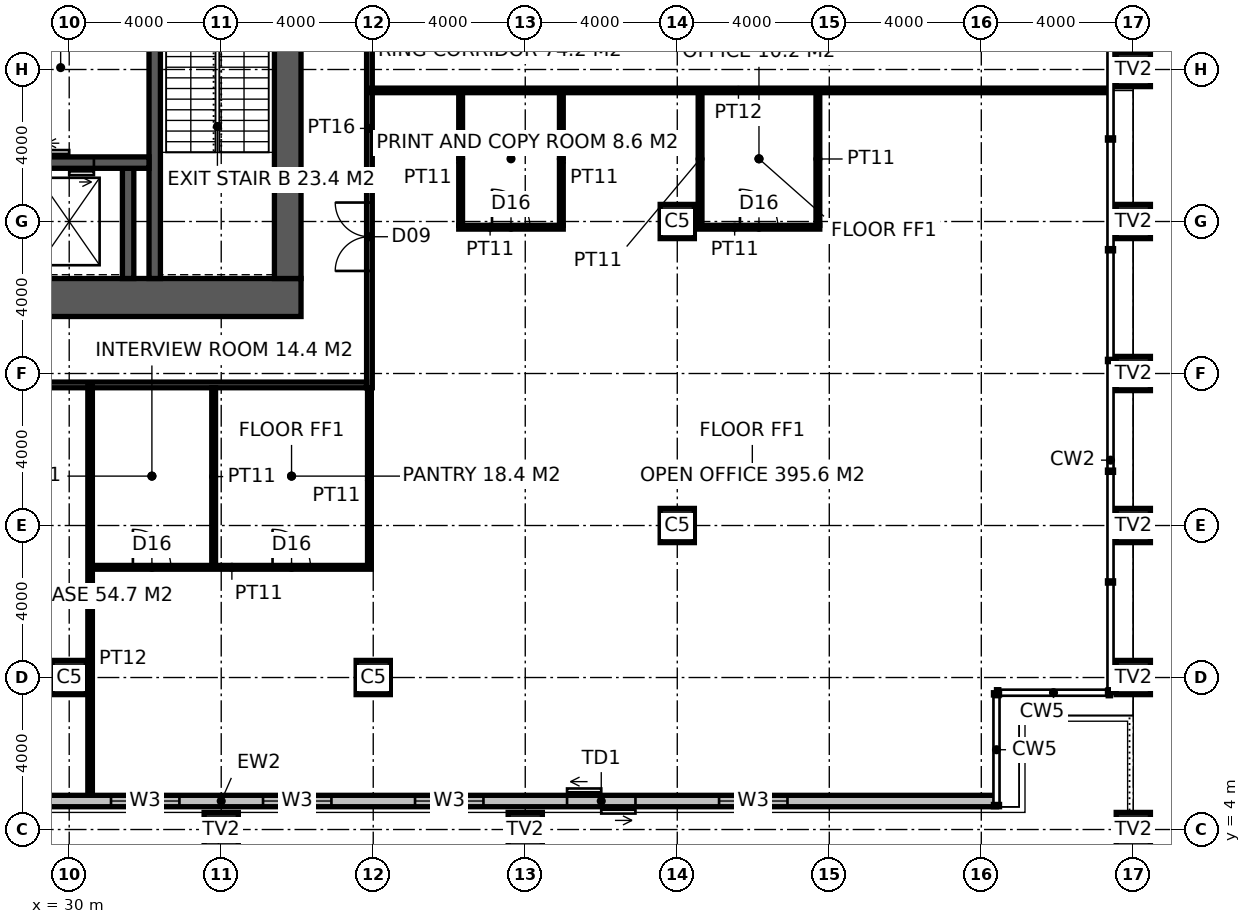
"""IFC4 building model, lengths in metres.
Left out: names, types, materials, properties, quantities, classifications, styles, units other than length and angle.
Written with IfcOpenShell. Run it as: python <this file> out.ifc"""

import sys

from ifc_helpers import new_model, si_unit, direction, frame, frame_2d, origin, origin_2d, place, context, subcontext, project, spatial, rectangle, hollow_rectangle, extrude, element, fill, save


model = new_model("IFC4")
c1 = context("Model", 3, precision=1e-05, world=origin(), true_north=direction((0.0, 1.0)))
c2 = subcontext(c1, "Body", "Model", "MODEL_VIEW")
j1 = project(units=[si_unit("LENGTHUNIT", "METRE"), si_unit("PLANEANGLEUNIT", "RADIAN")], contexts=[c1])
p1 = place(None, origin())
s1 = spatial("IfcSite", under=j1, at=p1, CompositionType="ELEMENT")
p2 = place(p1, origin())
s2 = spatial("IfcBuilding", under=s1, at=p2, CompositionType="ELEMENT")
p3 = place(p2, frame((0.0, 0.0, 105.4)))
s3 = spatial("IfcBuildingStorey", under=s2, at=p3, CompositionType="ELEMENT", Elevation=105.4)
for number, where, z_axis, x_axis in (
    (1, (34.0, 4.0, 0.0), (0.0, 0.0, 1.0), (1.0, 0.0, 0.0)),
    (2, (42.0, 4.0, 0.0), (0.0, 0.0, 1.0), (1.0, 0.0, 0.0)),
    (3, (58.0, 4.0, 0.0), (0.0, 0.0, 1.0), (1.0, 0.0, 0.0)),
    (4, (58.0, 8.0, 0.0), (0.0, 0.0, 1.0), (1.0, 0.0, 0.0)),
    (5, (58.0, 12.0, 0.0), (0.0, 0.0, 1.0), (1.0, 0.0, 0.0)),
    (6, (58.0, 16.0, 0.0), (0.0, 0.0, 1.0), (1.0, 0.0, 0.0)),
    (7, (58.0, 20.0, 0.0), (0.0, 0.0, 1.0), (1.0, 0.0, 0.0)),
    (8, (58.0, 24.0, 0.0), (0.0, 0.0, 1.0), (1.0, 0.0, 0.0)),
):
    element("IfcColumn", number, at=place(p3, frame(where, z_axis=z_axis, x_axis=x_axis)), inside=s3, PredefinedType="USERDEFINED", context=c2, shape_type="SweptSolid", body=[
        extrude(hollow_rectangle(XDim=0.9, YDim=0.9, WallThickness=0.1, at=origin_2d()), origin(), (0.0, 0.0, 1.0), 4.0),
    ])
for number, where, z_axis, x_axis in (
    (9, (30.0, 8.0, 0.0), (0.0, 0.0, 1.0), (1.0, 0.0, 0.0)),
    (10, (38.0, 8.0, 0.0), (0.0, 0.0, 1.0), (1.0, 0.0, 0.0)),
    (11, (46.0, 12.0, 0.0), (0.0, 0.0, 1.0), (1.0, 0.0, 0.0)),
    (12, (46.0, 20.0, 0.0), (0.0, 0.0, 1.0), (1.0, 0.0, 0.0)),
):
    element("IfcColumn", number, at=place(p3, frame(where, z_axis=z_axis, x_axis=x_axis)), inside=s3, PredefinedType="COLUMN", context=c2, shape_type="SweptSolid", body=[
        extrude(hollow_rectangle(XDim=0.9, YDim=0.9, WallThickness=0.1, at=origin_2d()), origin(), (0.0, 0.0, 1.0), 4.0),
    ])
p4 = place(p3, frame((18.5, 18.0, -0.15), z_axis=(0.0, 0.0, 1.0), x_axis=(1.0, 0.0, 0.0)))
e13 = element("IfcWall", 13, at=p4, inside=s3, PredefinedType="SHEAR", context=c2, shape_type="SweptSolid", body=[
    extrude(rectangle(XDim=17.6, YDim=1.0, at=frame_2d((8.8, 0.0))), origin(), (0.0, 0.0, 1.0), 4.0),
])
p5 = place(p4, frame((3.45, 0.0, 0.15)))
e14 = element("IfcOpeningElement", 14, at=p5, cuts=e13, PredefinedType="OPENING", context=c2, shape_type="SweptSolid", body=[
    extrude(rectangle(XDim=1.5, YDim=2.4, at=frame_2d((0.75, 1.2))), frame((0.0, 0.51, 0.0), z_axis=(0.0, -1.0, 0.0), x_axis=(1.0, 0.0, 0.0)), (0.0, 0.0, 1.0), 1.02),
])
p6 = place(p3, frame((35.75, 18.5, -0.15), z_axis=(0.0, 0.0, 1.0), x_axis=(0.0, 1.0, 0.0)))
e15 = element("IfcWall", 15, at=p6, inside=s3, PredefinedType="SHEAR", context=c2, shape_type="SweptSolid", body=[
    extrude(rectangle(XDim=17.0, YDim=0.7, at=frame_2d((8.5, 0.0))), origin(), (0.0, 0.0, 1.0), 4.0),
])
p7 = place(p6, frame((9.85, 0.0, 0.15)))
e16 = element("IfcOpeningElement", 16, at=p7, cuts=e15, PredefinedType="OPENING", context=c2, shape_type="SweptSolid", body=[
    extrude(rectangle(XDim=1.0, YDim=2.2, at=frame_2d((0.5, 1.1))), frame((0.0, 0.36, 0.0), z_axis=(0.0, -1.0, 0.0), x_axis=(1.0, 0.0, 0.0)), (0.0, 0.0, 1.0), 0.72),
])
p8 = place(p3, frame((32.25, 18.5, -0.15), z_axis=(0.0, 0.0, 1.0), x_axis=(0.0, 1.0, 0.0)))
e17 = element("IfcWall", 17, at=p8, inside=s3, PredefinedType="SHEAR", context=c2, shape_type="SweptSolid", body=[
    extrude(rectangle(XDim=7.9, YDim=0.3, at=frame_2d((3.95, 0.0))), origin(), (0.0, 0.0, 1.0), 4.0),
])
p9 = place(p3, frame((31.55, 18.5, -0.15), z_axis=(0.0, 0.0, 1.0), x_axis=(0.0, 1.0, 0.0)))
e18 = element("IfcWall", 18, at=p9, inside=s3, PredefinedType="SHEAR", context=c2, shape_type="SweptSolid", body=[
    extrude(rectangle(XDim=2.9, YDim=0.3, at=frame_2d((1.45, 0.0))), origin(), (0.0, 0.0, 1.0), 4.0),
])
p10 = place(p3, frame((28.3, 21.55, -0.15), z_axis=(0.0, 0.0, 1.0), x_axis=(1.0, 0.0, 0.0)))
e19 = element("IfcWall", 19, at=p10, inside=s3, PredefinedType="SHEAR", context=c2, shape_type="SweptSolid", body=[
    extrude(rectangle(XDim=3.8, YDim=0.3, at=frame_2d((1.9, 0.0))), origin(), (0.0, 0.0, 1.0), 4.0),
])
p11 = place(p10, frame((1.05, 0.0, 0.15)))
e20 = element("IfcOpeningElement", 20, at=p11, cuts=e19, PredefinedType="OPENING", context=c2, shape_type="SweptSolid", body=[
    extrude(rectangle(XDim=1.3, YDim=2.4, at=frame_2d((0.65, 1.2))), frame((0.0, 0.16, 0.0), z_axis=(0.0, -1.0, 0.0), x_axis=(1.0, 0.0, 0.0)), (0.0, 0.0, 1.0), 0.32),
])
p12 = place(p3, frame((37.9, 15.625, 0.0), z_axis=(0.0, 0.0, 1.0), x_axis=(0.0, 1.0, 0.0)))
e21 = element("IfcWall", 21, at=p12, inside=s3, PredefinedType="PARTITIONING", context=c2, shape_type="SweptSolid", body=[
    extrude(rectangle(XDim=22.75, YDim=0.15, at=frame_2d((11.375, 0.0))), origin(), (0.0, 0.0, 1.0), 2.65),
])
p13 = place(p12, frame((3.074, 0.0, 0.0)))
e22 = element("IfcOpeningElement", 22, at=p13, cuts=e21, PredefinedType="OPENING", context=c2, shape_type="SweptSolid", body=[
    extrude(rectangle(XDim=1.8, YDim=2.4, at=frame_2d((0.9, 1.2))), frame((0.0, 0.085, 0.0), z_axis=(0.0, -1.0, 0.0), x_axis=(1.0, 0.0, 0.0)), (0.0, 0.0, 1.0), 0.17),
])
p14 = place(p12, frame((16.876, 0.0, 0.0)))
e23 = element("IfcOpeningElement", 23, at=p14, cuts=e21, PredefinedType="OPENING", context=c2, shape_type="SweptSolid", body=[
    extrude(rectangle(XDim=1.8, YDim=2.4, at=frame_2d((0.9, 1.2))), frame((0.0, 0.085, 0.0), z_axis=(0.0, -1.0, 0.0), x_axis=(1.0, 0.0, 0.0)), (0.0, 0.0, 1.0), 0.17),
])
p15 = place(p12, frame((9.875, 0.0, 0.0)))
e24 = element("IfcOpeningElement", 24, at=p15, cuts=e21, PredefinedType="OPENING", context=c2, shape_type="SweptSolid", body=[
    extrude(rectangle(XDim=1.0, YDim=2.2, at=frame_2d((0.5, 1.1))), frame((0.0, 0.085, 0.0), z_axis=(0.0, -1.0, 0.0), x_axis=(1.0, 0.0, 0.0)), (0.0, 0.0, 1.0), 0.17),
])
p16 = place(p3, frame((15.175, 15.7, 0.0), z_axis=(0.0, 0.0, 1.0), x_axis=(1.0, 0.0, 0.0)))
e25 = element("IfcWall", 25, at=p16, inside=s3, PredefinedType="PARTITIONING", context=c2, shape_type="SweptSolid", body=[
    extrude(rectangle(XDim=22.65, YDim=0.15, at=frame_2d((11.325, 0.0))), origin(), (0.0, 0.0, 1.0), 3.85),
])
p17 = place(p16, frame((12.325, 0.0, 0.0)))
e26 = element("IfcOpeningElement", 26, at=p17, cuts=e25, PredefinedType="OPENING", context=c2, shape_type="SweptSolid", body=[
    extrude(rectangle(XDim=1.0, YDim=2.2, at=frame_2d((0.5, 1.1))), frame((0.0, 0.085, 0.0), z_axis=(0.0, -1.0, 0.0), x_axis=(1.0, 0.0, 0.0)), (0.0, 0.0, 1.0), 0.17),
])
p18 = place(p3, frame((30.55, 4.68, 0.0), z_axis=(0.0, 0.0, 1.0), x_axis=(0.0, 1.0, 0.0)))
e27 = element("IfcWall", 27, at=p18, inside=s3, PredefinedType="PARTITIONING", context=c2, shape_type="SweptSolid", body=[
    extrude(rectangle(XDim=11.02, YDim=0.12, at=frame_2d((5.51, 0.0))), origin(), (0.0, 0.0, 1.0), 2.65),
])
p19 = place(p3, frame((37.9, 23.45, 0.0), z_axis=(0.0, 0.0, 1.0), x_axis=(1.0, 0.0, 0.0)))
e28 = element("IfcWall", 28, at=p19, inside=s3, PredefinedType="PARTITIONING", context=c2, shape_type="SweptSolid", body=[
    extrude(rectangle(XDim=19.42, YDim=0.12, at=frame_2d((9.71, 0.0))), origin(), (0.0, 0.0, 1.0), 2.65),
])
p20 = place(p3, frame((30.611, 10.9, 0.0), z_axis=(0.0, 0.0, 1.0), x_axis=(1.0, 0.0, 0.0)))
e29 = element("IfcWall", 29, at=p20, inside=s3, PredefinedType="PARTITIONING", context=c2, shape_type="SweptSolid", body=[
    extrude(rectangle(XDim=7.339, YDim=0.1, at=frame_2d((3.669, 0.0))), origin(), (0.0, 0.0, 1.0), 3.85),
])
p21 = place(p20, frame((1.065, 0.0, 0.0)))
e30 = element("IfcOpeningElement", 30, at=p21, cuts=e29, PredefinedType="OPENING", context=c2, shape_type="SweptSolid", body=[
    extrude(rectangle(XDim=1.0, YDim=2.2, at=frame_2d((0.5, 1.1))), frame((0.0, 0.06, 0.0), z_axis=(0.0, -1.0, 0.0), x_axis=(1.0, 0.0, 0.0)), (0.0, 0.0, 1.0), 0.12),
])
p22 = place(p20, frame((4.74, 0.0, 0.0)))
e31 = element("IfcOpeningElement", 31, at=p22, cuts=e29, PredefinedType="OPENING", context=c2, shape_type="SweptSolid", body=[
    extrude(rectangle(XDim=1.0, YDim=2.2, at=frame_2d((0.5, 1.1))), frame((0.0, 0.06, 0.0), z_axis=(0.0, -1.0, 0.0), x_axis=(1.0, 0.0, 0.0)), (0.0, 0.0, 1.0), 0.12),
])
p23 = place(p3, frame((40.25, 19.85, 0.0), z_axis=(0.0, 0.0, 1.0), x_axis=(1.0, 0.0, 0.0)))
e32 = element("IfcWall", 32, at=p23, inside=s3, PredefinedType="PARTITIONING", context=c2, shape_type="SweptSolid", body=[
    extrude(rectangle(XDim=2.75, YDim=0.1, at=frame_2d((1.375, 0.0))), origin(), (0.0, 0.0, 1.0), 2.85),
])
p24 = place(p23, frame((0.875, 0.0, 0.0)))
e33 = element("IfcOpeningElement", 33, at=p24, cuts=e32, PredefinedType="OPENING", context=c2, shape_type="SweptSolid", body=[
    extrude(rectangle(XDim=1.0, YDim=2.2, at=frame_2d((0.5, 1.1))), frame((0.0, 0.06, 0.0), z_axis=(0.0, -1.0, 0.0), x_axis=(1.0, 0.0, 0.0)), (0.0, 0.0, 1.0), 0.12),
])
p25 = place(p3, frame((46.55, 19.85, 0.0), z_axis=(0.0, 0.0, 1.0), x_axis=(1.0, 0.0, 0.0)))
e34 = element("IfcWall", 34, at=p25, inside=s3, PredefinedType="PARTITIONING", context=c2, shape_type="SweptSolid", body=[
    extrude(rectangle(XDim=3.2, YDim=0.1, at=frame_2d((1.6, 0.0))), origin(), (0.0, 0.0, 1.0), 2.85),
])
p26 = place(p25, frame((1.1, 0.0, 0.0)))
e35 = element("IfcOpeningElement", 35, at=p26, cuts=e34, PredefinedType="OPENING", context=c2, shape_type="SweptSolid", body=[
    extrude(rectangle(XDim=1.0, YDim=2.2, at=frame_2d((0.5, 1.1))), frame((0.0, 0.06, 0.0), z_axis=(0.0, -1.0, 0.0), x_axis=(1.0, 0.0, 0.0)), (0.0, 0.0, 1.0), 0.12),
])
for number, where, z_axis, x_axis in (
    (36, (33.801, 10.95, 0.0), (0.0, 0.0, 1.0), (0.0, 1.0, 0.0)),
    (37, (37.9, 10.95, 0.0), (0.0, 0.0, 1.0), (0.0, 1.0, 0.0)),
):
    element("IfcWall", number, at=place(p3, frame(where, z_axis=z_axis, x_axis=x_axis)), inside=s3, PredefinedType="PARTITIONING", context=c2, shape_type="SweptSolid", body=[
        extrude(rectangle(XDim=4.675, YDim=0.1, at=frame_2d((2.337, 0.0))), origin(), (0.0, 0.0, 1.0), 2.65),
    ])
for number, where, z_axis, x_axis in (
    (38, (40.3, 19.9, 0.0), (0.0, 0.0, 1.0), (0.0, 1.0, 0.0)),
    (39, (42.95, 19.9, 0.0), (0.0, 0.0, 1.0), (0.0, 1.0, 0.0)),
    (40, (46.6, 19.9, 0.0), (0.0, 0.0, 1.0), (0.0, 1.0, 0.0)),
    (41, (49.7, 19.9, 0.0), (0.0, 0.0, 1.0), (0.0, 1.0, 0.0)),
):
    element("IfcWall", number, at=place(p3, frame(where, z_axis=z_axis, x_axis=x_axis)), inside=s3, PredefinedType="PARTITIONING", context=c2, shape_type="SweptSolid", body=[
        extrude(rectangle(XDim=3.49, YDim=0.1, at=frame_2d((1.745, 0.0))), origin(), (0.0, 0.0, 1.0), 3.85),
    ])
p27 = place(p3, frame((13.6, 4.75, 0.0), z_axis=(0.0, 0.0, 1.0), x_axis=(1.0, 0.0, 0.0)))
e42 = element("IfcWall", 42, at=p27, inside=s3, PredefinedType="ELEMENTEDWALL", context=c2, shape_type="SweptSolid", body=[
    extrude(rectangle(XDim=40.8, YDim=0.3, at=frame_2d((20.4, 0.0))), origin(), (0.0, 0.0, 1.0), 3.85),
])
p28 = place(p27, frame((5.5, 0.0, 0.8)))
e43 = element("IfcOpeningElement", 43, at=p28, cuts=e42, PredefinedType="OPENING", context=c2, shape_type="SweptSolid", body=[
    extrude(rectangle(XDim=1.8, YDim=2.4, at=frame_2d((0.9, 1.2))), frame((0.0, 0.16, 0.0), z_axis=(0.0, -1.0, 0.0), x_axis=(1.0, 0.0, 0.0)), (0.0, 0.0, 1.0), 0.32),
])
p29 = place(p27, frame((9.5, 0.0, 0.8)))
e44 = element("IfcOpeningElement", 44, at=p29, cuts=e42, PredefinedType="OPENING", context=c2, shape_type="SweptSolid", body=[
    extrude(rectangle(XDim=1.8, YDim=2.4, at=frame_2d((0.9, 1.2))), frame((0.0, 0.16, 0.0), z_axis=(0.0, -1.0, 0.0), x_axis=(1.0, 0.0, 0.0)), (0.0, 0.0, 1.0), 0.32),
])
p30 = place(p27, frame((13.5, 0.0, 0.0)))
e45 = element("IfcOpeningElement", 45, at=p30, cuts=e42, PredefinedType="OPENING", context=c2, shape_type="SweptSolid", body=[
    extrude(rectangle(XDim=1.8, YDim=2.4, at=frame_2d((0.9, 1.2))), frame((0.0, 0.16, 0.0), z_axis=(0.0, -1.0, 0.0), x_axis=(1.0, 0.0, 0.0)), (0.0, 0.0, 1.0), 0.32),
])
p31 = place(p27, frame((17.5, 0.0, 0.8)))
e46 = element("IfcOpeningElement", 46, at=p31, cuts=e42, PredefinedType="OPENING", context=c2, shape_type="SweptSolid", body=[
    extrude(rectangle(XDim=1.8, YDim=2.4, at=frame_2d((0.9, 1.2))), frame((0.0, 0.16, 0.0), z_axis=(0.0, -1.0, 0.0), x_axis=(1.0, 0.0, 0.0)), (0.0, 0.0, 1.0), 0.32),
])
p32 = place(p27, frame((21.5, 0.0, 0.8)))
e47 = element("IfcOpeningElement", 47, at=p32, cuts=e42, PredefinedType="OPENING", context=c2, shape_type="SweptSolid", body=[
    extrude(rectangle(XDim=1.8, YDim=2.4, at=frame_2d((0.9, 1.2))), frame((0.0, 0.16, 0.0), z_axis=(0.0, -1.0, 0.0), x_axis=(1.0, 0.0, 0.0)), (0.0, 0.0, 1.0), 0.32),
])
p33 = place(p27, frame((25.5, 0.0, 0.8)))
e48 = element("IfcOpeningElement", 48, at=p33, cuts=e42, PredefinedType="OPENING", context=c2, shape_type="SweptSolid", body=[
    extrude(rectangle(XDim=1.8, YDim=2.4, at=frame_2d((0.9, 1.2))), frame((0.0, 0.16, 0.0), z_axis=(0.0, -1.0, 0.0), x_axis=(1.0, 0.0, 0.0)), (0.0, 0.0, 1.0), 0.32),
])
p34 = place(p27, frame((29.5, 0.0, 0.0)))
e49 = element("IfcOpeningElement", 49, at=p34, cuts=e42, PredefinedType="OPENING", context=c2, shape_type="SweptSolid", body=[
    extrude(rectangle(XDim=1.8, YDim=2.4, at=frame_2d((0.9, 1.2))), frame((0.0, 0.16, 0.0), z_axis=(0.0, -1.0, 0.0), x_axis=(1.0, 0.0, 0.0)), (0.0, 0.0, 1.0), 0.32),
])
p35 = place(p27, frame((33.5, 0.0, 0.8)))
e50 = element("IfcOpeningElement", 50, at=p35, cuts=e42, PredefinedType="OPENING", context=c2, shape_type="SweptSolid", body=[
    extrude(rectangle(XDim=1.8, YDim=2.4, at=frame_2d((0.9, 1.2))), frame((0.0, 0.16, 0.0), z_axis=(0.0, -1.0, 0.0), x_axis=(1.0, 0.0, 0.0)), (0.0, 0.0, 1.0), 0.32),
])
p36 = place(p13, origin())
e51 = element("IfcDoor", 51, at=p36, inside=s3, OperationType="DOUBLE_DOOR_DOUBLE_SWING", PredefinedType="DOOR", context=c2, shape_type="SweptSolid", body=[
    extrude(rectangle(XDim=1.8, YDim=2.4, at=frame_2d((0.9, 1.2))), frame((0.0, 0.025, 0.0), z_axis=(0.0, -1.0, 0.0), x_axis=(1.0, 0.0, 0.0)), (0.0, 0.0, 1.0), 0.05),
])
fill(e22, e51)
p37 = place(p21, origin())
e52 = element("IfcDoor", 52, at=p37, inside=s3, OperationType="SINGLE_SWING_LEFT", PredefinedType="DOOR", context=c2, shape_type="SweptSolid", body=[
    extrude(rectangle(XDim=1.0, YDim=2.2, at=frame_2d((0.5, 1.1))), frame((0.0, 0.025, 0.0), z_axis=(0.0, -1.0, 0.0), x_axis=(1.0, 0.0, 0.0)), (0.0, 0.0, 1.0), 0.05),
])
fill(e30, e52)
p38 = place(p22, origin())
e53 = element("IfcDoor", 53, at=p38, inside=s3, OperationType="SINGLE_SWING_LEFT", PredefinedType="DOOR", context=c2, shape_type="SweptSolid", body=[
    extrude(rectangle(XDim=1.0, YDim=2.2, at=frame_2d((0.5, 1.1))), frame((0.0, 0.025, 0.0), z_axis=(0.0, -1.0, 0.0), x_axis=(1.0, 0.0, 0.0)), (0.0, 0.0, 1.0), 0.05),
])
fill(e31, e53)
p39 = place(p24, origin())
e54 = element("IfcDoor", 54, at=p39, inside=s3, OperationType="SINGLE_SWING_LEFT", PredefinedType="DOOR", context=c2, shape_type="SweptSolid", body=[
    extrude(rectangle(XDim=1.0, YDim=2.2, at=frame_2d((0.5, 1.1))), frame((0.0, 0.025, 0.0), z_axis=(0.0, -1.0, 0.0), x_axis=(1.0, 0.0, 0.0)), (0.0, 0.0, 1.0), 0.05),
])
fill(e33, e54)
p40 = place(p26, origin())
e55 = element("IfcDoor", 55, at=p40, inside=s3, OperationType="SINGLE_SWING_LEFT", PredefinedType="DOOR", context=c2, shape_type="SweptSolid", body=[
    extrude(rectangle(XDim=1.0, YDim=2.2, at=frame_2d((0.5, 1.1))), frame((0.0, 0.025, 0.0), z_axis=(0.0, -1.0, 0.0), x_axis=(1.0, 0.0, 0.0)), (0.0, 0.0, 1.0), 0.05),
])
fill(e35, e55)
p41 = place(p11, origin())
e56 = element("IfcDoor", 56, at=p41, inside=s3, OperationType="DOUBLE_DOOR_SLIDING", PredefinedType="DOOR", context=c2, shape_type="SweptSolid", body=[
    extrude(rectangle(XDim=1.3, YDim=2.4, at=frame_2d((0.65, 1.2))), frame((0.0, 0.025, 0.0), z_axis=(0.0, -1.0, 0.0), x_axis=(1.0, 0.0, 0.0)), (0.0, 0.0, 1.0), 0.05),
])
fill(e20, e56)
p42 = place(p31, origin())
e57 = element("IfcWindow", 57, at=p42, inside=s3, PartitioningType="SINGLE_PANEL", PredefinedType="WINDOW", context=c2, shape_type="SweptSolid", body=[
    extrude(rectangle(XDim=1.8, YDim=2.4, at=frame_2d((0.9, 1.2))), frame((0.0, 0.03, 0.0), z_axis=(0.0, -1.0, 0.0), x_axis=(1.0, 0.0, 0.0)), (0.0, 0.0, 1.0), 0.06),
])
fill(e46, e57)
p43 = place(p32, origin())
e58 = element("IfcWindow", 58, at=p43, inside=s3, PartitioningType="SINGLE_PANEL", PredefinedType="WINDOW", context=c2, shape_type="SweptSolid", body=[
    extrude(rectangle(XDim=1.8, YDim=2.4, at=frame_2d((0.9, 1.2))), frame((0.0, 0.03, 0.0), z_axis=(0.0, -1.0, 0.0), x_axis=(1.0, 0.0, 0.0)), (0.0, 0.0, 1.0), 0.06),
])
fill(e47, e58)
p44 = place(p33, origin())
e59 = element("IfcWindow", 59, at=p44, inside=s3, PartitioningType="SINGLE_PANEL", PredefinedType="WINDOW", context=c2, shape_type="SweptSolid", body=[
    extrude(rectangle(XDim=1.8, YDim=2.4, at=frame_2d((0.9, 1.2))), frame((0.0, 0.03, 0.0), z_axis=(0.0, -1.0, 0.0), x_axis=(1.0, 0.0, 0.0)), (0.0, 0.0, 1.0), 0.06),
])
fill(e48, e59)
p45 = place(p34, origin())
e60 = element("IfcDoor", 60, at=p45, inside=s3, OperationType="DOUBLE_DOOR_SLIDING", PredefinedType="DOOR", context=c2, shape_type="SweptSolid", body=[
    extrude(rectangle(XDim=1.8, YDim=2.4, at=frame_2d((0.9, 1.2))), frame((0.0, 0.025, 0.0), z_axis=(0.0, -1.0, 0.0), x_axis=(1.0, 0.0, 0.0)), (0.0, 0.0, 1.0), 0.05),
])
fill(e49, e60)
p46 = place(p35, origin())
e61 = element("IfcWindow", 61, at=p46, inside=s3, PartitioningType="SINGLE_PANEL", PredefinedType="WINDOW", context=c2, shape_type="SweptSolid", body=[
    extrude(rectangle(XDim=1.8, YDim=2.4, at=frame_2d((0.9, 1.2))), frame((0.0, 0.03, 0.0), z_axis=(0.0, -1.0, 0.0), x_axis=(1.0, 0.0, 0.0)), (0.0, 0.0, 1.0), 0.06),
])
fill(e50, e61)
save(model, sys.argv[1])
